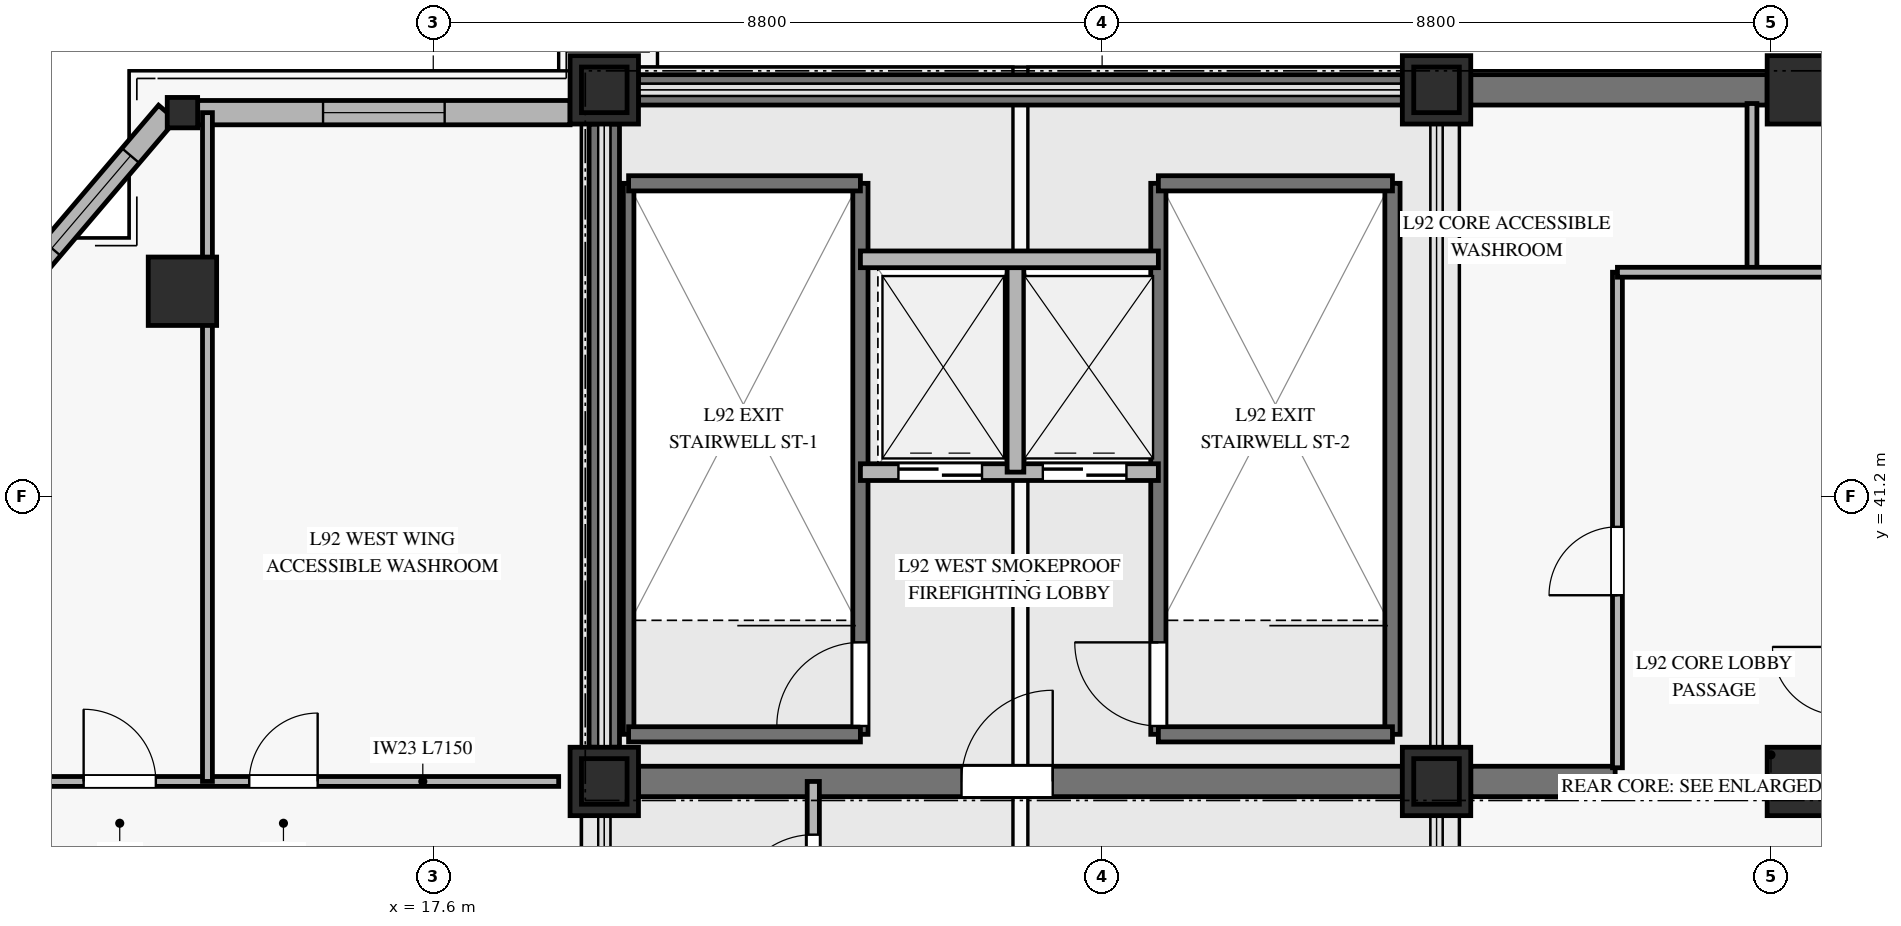
"""IFC4 building model, lengths in metres.
Left out: names, types, materials, properties, quantities, classifications, styles, units other than length and angle.
Written with IfcOpenShell. Run it as: python <this file> out.ifc"""

import sys

from ifc_helpers import new_model, si_unit, direction, frame, frame_2d, origin, origin_2d, place, context, subcontext, project, spatial, rectangle, hollow_rectangle, extrude, source, transform, mapped, element, fill, save


model = new_model("IFC4")
c1 = context("Model", 3, precision=1e-05, world=origin(), true_north=direction((0.0, 1.0)))
c2 = subcontext(c1, "Body", "Model", "MODEL_VIEW")
j1 = project(units=[si_unit("LENGTHUNIT", "METRE"), si_unit("PLANEANGLEUNIT", "RADIAN")], contexts=[c1])
p1 = place(None, origin())
s1 = spatial("IfcSite", under=j1, at=p1, CompositionType="ELEMENT")
p2 = place(p1, origin())
s2 = spatial("IfcBuilding", under=s1, at=p2, CompositionType="ELEMENT")
p3 = place(p2, frame((0.0, 0.0, 352.7)))
s3 = spatial("IfcBuildingStorey", under=s2, at=p3, CompositionType="ELEMENT", Elevation=352.7)
m1 = source(origin(), c2, "Body", "SweptSolid", [
    extrude(rectangle(XDim=0.9, YDim=0.9, at=origin_2d()), origin(), (0.0, 0.0, 1.0), 6.16),
])
for number, where, z_axis, x_axis in (
    (1, (19.85, 37.45, 0.0), (0.0, 0.0, 1.0), (1.0, 0.0, 0.0)),
    (2, (19.85, 46.55, 0.0), (0.0, 0.0, 1.0), (1.0, 0.0, 0.0)),
    (3, (30.8, 37.45, 0.0), (0.0, 0.0, 1.0), (1.0, 0.0, 0.0)),
    (4, (30.8, 46.55, 0.0), (0.0, 0.0, 1.0), (1.0, 0.0, 0.0)),
    (5, (35.6, 37.45, 0.0), (0.0, 0.0, 1.0), (1.0, 0.0, 0.0)),
    (6, (35.6, 46.55, 0.0), (0.0, 0.0, 1.0), (1.0, 0.0, 0.0)),
):
    element("IfcColumn", number, at=place(p3, frame(where, z_axis=z_axis, x_axis=x_axis)), inside=s3, PredefinedType="PILASTER", context=c2, shape_type="MappedRepresentation", body=[
        mapped(m1, transform((0.0, 0.0, 0.0), x_axis=(1.0, 0.0, 0.0), y_axis=(0.0, 1.0, 0.0), z_axis=(0.0, 0.0, 1.0), scale=1.0)),
    ])
p4 = place(p3, frame((20.3, 46.55, 0.0), z_axis=(0.0, 0.0, 1.0), x_axis=(1.0, 0.0, 0.0)))
e7 = element("IfcWall", 7, at=p4, inside=s3, PredefinedType="SHEAR", context=c2, shape_type="SweptSolid", body=[
    extrude(rectangle(XDim=10.05, YDim=0.4, at=frame_2d((5.025, 0.0))), origin(), (0.0, 0.0, 1.0), 6.16),
])
p5 = place(p3, frame((31.25, 46.55, 0.0), z_axis=(0.0, 0.0, 1.0), x_axis=(1.0, 0.0, 0.0)))
e8 = element("IfcWall", 8, at=p5, inside=s3, PredefinedType="SHEAR", context=c2, shape_type="SweptSolid", body=[
    extrude(rectangle(XDim=3.9, YDim=0.4, at=frame_2d((1.95, 0.0))), origin(), (0.0, 0.0, 1.0), 6.16),
])
p6 = place(p3, frame((20.3, 37.45, 0.0), z_axis=(0.0, 0.0, 1.0), x_axis=(1.0, 0.0, 0.0)))
e9 = element("IfcWall", 9, at=p6, inside=s3, PredefinedType="SHEAR", context=c2, shape_type="SweptSolid", body=[
    extrude(rectangle(XDim=10.05, YDim=0.4, at=frame_2d((5.025, 0.0))), origin(), (0.0, 0.0, 1.0), 6.16),
])
p7 = place(p6, frame((4.25, 0.0, 0.0)))
e10 = element("IfcOpeningElement", 10, at=p7, cuts=e9, PredefinedType="OPENING", context=c2, shape_type="SweptSolid", body=[
    extrude(rectangle(XDim=1.2, YDim=2.15, at=frame_2d((0.6, 1.075))), frame((0.0, 0.21, 0.0), z_axis=(0.0, -1.0, 0.0), x_axis=(1.0, 0.0, 0.0)), (0.0, 0.0, 1.0), 0.42),
])
p8 = place(p3, frame((31.25, 37.45, 0.0), z_axis=(0.0, 0.0, 1.0), x_axis=(1.0, 0.0, 0.0)))
e11 = element("IfcWall", 11, at=p8, inside=s3, PredefinedType="SHEAR", context=c2, shape_type="SweptSolid", body=[
    extrude(rectangle(XDim=1.9, YDim=0.4, at=frame_2d((0.95, 0.0))), origin(), (0.0, 0.0, 1.0), 6.16),
])
p9 = place(p3, frame((19.85, 37.9, 0.0), z_axis=(0.0, 0.0, 1.0), x_axis=(0.0, 1.0, 0.0)))
e12 = element("IfcWall", 12, at=p9, inside=s3, PredefinedType="SHEAR", context=c2, shape_type="SweptSolid", body=[
    extrude(rectangle(XDim=8.2, YDim=0.4, at=frame_2d((4.1, 0.0))), origin(), (0.0, 0.0, 1.0), 6.16),
])
m2 = source(origin(), c2, "Body", "SweptSolid", [
    extrude(hollow_rectangle(XDim=0.9, YDim=0.9, WallThickness=0.04, at=origin_2d()), origin(), (0.0, 0.0, 1.0), 6.16),
])
p10 = place(p3, frame((14.3, 43.9, 0.0), z_axis=(0.0, 0.0, 1.0), x_axis=(1.0, 0.0, 0.0)))
e13 = element("IfcColumn", 13, at=p10, inside=s3, PredefinedType="COLUMN", context=c2, shape_type="MappedRepresentation", body=[
    mapped(m2, transform((0.0, 0.0, 0.0), x_axis=(1.0, 0.0, 0.0), y_axis=(0.0, 1.0, 0.0), z_axis=(0.0, 0.0, 1.0), scale=1.0)),
])
m3 = source(origin(), c2, "Body", "SweptSolid", [
    extrude(hollow_rectangle(XDim=0.4, YDim=0.4, WallThickness=0.02, at=origin_2d()), origin(), (0.0, 0.0, 1.0), 6.16),
])
p11 = place(p3, frame((14.3, 46.25, 0.0), z_axis=(0.0, 0.0, 1.0), x_axis=(1.0, 0.0, 0.0)))
e14 = element("IfcColumn", 14, at=p11, inside=s3, PredefinedType="COLUMN", context=c2, shape_type="MappedRepresentation", body=[
    mapped(m3, transform((0.0, 0.0, 0.0), x_axis=(1.0, 0.0, 0.0), y_axis=(0.0, 1.0, 0.0), z_axis=(0.0, 0.0, 1.0), scale=1.0)),
])
m4 = source(origin(), c2, "Body", "SweptSolid", [
    extrude(hollow_rectangle(XDim=0.6, YDim=0.6, WallThickness=0.028, at=origin_2d()), origin(), (0.0, 0.0, 1.0), 21.147),
])
for number, where, z_axis, x_axis in (
    (15, (30.8, 37.45, 6.4), (0.0, 0.0, 1.0), (1.0, 0.0, 0.0)),
    (16, (30.8, 46.55, 6.4), (0.0, 0.0, 1.0), (1.0, 0.0, 0.0)),
    (17, (19.85, 46.55, 6.4), (0.0, 0.0, 1.0), (1.0, 0.0, 0.0)),
    (18, (19.85, 37.45, 6.4), (0.0, 0.0, 1.0), (1.0, 0.0, 0.0)),
):
    element("IfcColumn", number, at=place(p3, frame(where, z_axis=z_axis, x_axis=x_axis)), inside=s3, PredefinedType="COLUMN", context=c2, shape_type="MappedRepresentation", body=[
        mapped(m4, transform((0.0, 0.0, 0.0), x_axis=(1.0, 0.0, 0.0), y_axis=(0.0, 1.0, 0.0), z_axis=(0.0, 0.0, 1.0), scale=1.0)),
    ])
p12 = place(p3, frame((14.5, 46.25, 0.0), z_axis=(0.0, 0.0, 1.0), x_axis=(1.0, 0.0, 0.0)))
e19 = element("IfcWall", 19, at=p12, inside=s3, PredefinedType="SOLIDWALL", context=c2, shape_type="SweptSolid", body=[
    extrude(rectangle(XDim=4.9, YDim=0.32, at=frame_2d((2.45, 0.0))), origin(), (0.0, 0.0, 1.0), 5.79),
])
p13 = place(p12, frame((1.65, 0.0, 0.45)))
e20 = element("IfcOpeningElement", 20, at=p13, cuts=e19, PredefinedType="OPENING", context=c2, shape_type="SweptSolid", body=[
    extrude(rectangle(XDim=1.6, YDim=2.0, at=frame_2d((0.8, 1.0))), frame((0.0, 0.17, 0.0), z_axis=(0.0, -1.0, 0.0), x_axis=(1.0, 0.0, 0.0)), (0.0, 0.0, 1.0), 0.34),
])
p14 = place(p3, frame((14.1, 46.25, 0.0), z_axis=(0.0, 0.0, 1.0), x_axis=(-0.648103010114, -0.761552682538, 0.0)))
e21 = element("IfcWall", 21, at=p14, inside=s3, PredefinedType="SOLIDWALL", context=c2, shape_type="SweptSolid", body=[
    extrude(rectangle(XDim=3.086, YDim=0.3, at=frame_2d((1.543, 0.0))), origin(), (0.0, 0.0, 1.0), 5.79),
])
p15 = place(p14, frame((0.743, 0.0, 0.45)))
e22 = element("IfcOpeningElement", 22, at=p15, cuts=e21, PredefinedType="OPENING", context=c2, shape_type="SweptSolid", body=[
    extrude(rectangle(XDim=1.6, YDim=2.0, at=frame_2d((0.8, 1.0))), frame((0.0, 0.16, 0.0), z_axis=(0.0, -1.0, 0.0), x_axis=(1.0, 0.0, 0.0)), (0.0, 0.0, 1.0), 0.32),
])
p16 = place(p3, frame((20.17, 38.07, 0.0), z_axis=(0.0, 0.0, 1.0), x_axis=(0.0, 1.0, 0.0)))
e23 = element("IfcWall", 23, at=p16, inside=s3, PredefinedType="SOLIDWALL", context=c2, shape_type="SweptSolid", body=[
    extrude(rectangle(XDim=7.25, YDim=0.14, at=frame_2d((3.625, 0.0))), origin(), (0.0, 0.0, 1.0), 6.4),
])
p17 = place(p3, frame((23.22, 38.07, 0.0), z_axis=(0.0, 0.0, 1.0), x_axis=(0.0, 1.0, 0.0)))
e24 = element("IfcWall", 24, at=p17, inside=s3, PredefinedType="SOLIDWALL", context=c2, shape_type="SweptSolid", body=[
    extrude(rectangle(XDim=7.25, YDim=0.2, at=frame_2d((3.625, 0.0))), origin(), (0.0, 0.0, 1.0), 6.4),
])
p18 = place(p17, frame((0.11, 0.0, 0.0)))
e25 = element("IfcOpeningElement", 25, at=p18, cuts=e24, PredefinedType="OPENING", context=c2, shape_type="SweptSolid", body=[
    extrude(rectangle(XDim=1.1, YDim=2.15, at=frame_2d((0.55, 1.075))), frame((0.0, 0.11, 0.0), z_axis=(0.0, -1.0, 0.0), x_axis=(1.0, 0.0, 0.0)), (0.0, 0.0, 1.0), 0.22),
])
for number, where, z_axis, x_axis in (
    (26, (20.17, 45.32, 0.0), (0.0, 0.0, 1.0), (1.0, 0.0, 0.0)),
    (27, (20.17, 38.07, 0.0), (0.0, 0.0, 1.0), (1.0, 0.0, 0.0)),
):
    element("IfcWall", number, at=place(p3, frame(where, z_axis=z_axis, x_axis=x_axis)), inside=s3, PredefinedType="SOLIDWALL", context=c2, shape_type="SweptSolid", body=[
        extrude(rectangle(XDim=3.05, YDim=0.2, at=frame_2d((1.525, 0.0))), origin(), (0.0, 0.0, 1.0), 6.4),
    ])
p19 = place(p3, frame((27.14, 38.07, 0.0), z_axis=(0.0, 0.0, 1.0), x_axis=(0.0, 1.0, 0.0)))
e28 = element("IfcWall", 28, at=p19, inside=s3, PredefinedType="SOLIDWALL", context=c2, shape_type="SweptSolid", body=[
    extrude(rectangle(XDim=7.25, YDim=0.2, at=frame_2d((3.625, 0.0))), origin(), (0.0, 0.0, 1.0), 6.4),
])
p20 = place(p19, frame((0.11, 0.0, 0.0)))
e29 = element("IfcOpeningElement", 29, at=p20, cuts=e28, PredefinedType="OPENING", context=c2, shape_type="SweptSolid", body=[
    extrude(rectangle(XDim=1.1, YDim=2.15, at=frame_2d((0.55, 1.075))), frame((0.0, 0.11, 0.0), z_axis=(0.0, -1.0, 0.0), x_axis=(1.0, 0.0, 0.0)), (0.0, 0.0, 1.0), 0.22),
])
p21 = place(p3, frame((30.22, 38.07, 0.0), z_axis=(0.0, 0.0, 1.0), x_axis=(0.0, 1.0, 0.0)))
e30 = element("IfcWall", 30, at=p21, inside=s3, PredefinedType="SOLIDWALL", context=c2, shape_type="SweptSolid", body=[
    extrude(rectangle(XDim=7.25, YDim=0.2, at=frame_2d((3.625, 0.0))), origin(), (0.0, 0.0, 1.0), 6.4),
])
for number, where, z_axis, x_axis in (
    (31, (27.14, 45.32, 0.0), (0.0, 0.0, 1.0), (1.0, 0.0, 0.0)),
    (32, (27.14, 38.07, 0.0), (0.0, 0.0, 1.0), (1.0, 0.0, 0.0)),
):
    element("IfcWall", number, at=place(p3, frame(where, z_axis=z_axis, x_axis=x_axis)), inside=s3, PredefinedType="SOLIDWALL", context=c2, shape_type="SweptSolid", body=[
        extrude(rectangle(XDim=3.08, YDim=0.2, at=frame_2d((1.54, 0.0))), origin(), (0.0, 0.0, 1.0), 6.4),
    ])
p22 = place(p3, frame((23.22, 41.52, 0.0), z_axis=(0.0, 0.0, 1.0), x_axis=(1.0, 0.0, 0.0)))
e33 = element("IfcWall", 33, at=p22, inside=s3, PredefinedType="SOLIDWALL", context=c2, shape_type="SweptSolid", body=[
    extrude(rectangle(XDim=3.92, YDim=0.22, at=frame_2d((1.96, 0.0))), origin(), (0.0, 0.0, 1.0), 6.16),
])
p23 = place(p22, frame((0.5, 0.0, 0.0)))
e34 = element("IfcOpeningElement", 34, at=p23, cuts=e33, PredefinedType="OPENING", context=c2, shape_type="SweptSolid", body=[
    extrude(rectangle(XDim=1.1, YDim=2.2, at=frame_2d((0.55, 1.1))), frame((0.0, 0.12, 0.0), z_axis=(0.0, -1.0, 0.0), x_axis=(1.0, 0.0, 0.0)), (0.0, 0.0, 1.0), 0.24),
])
p24 = place(p22, frame((2.4, 0.0, 0.0)))
e35 = element("IfcOpeningElement", 35, at=p24, cuts=e33, PredefinedType="OPENING", context=c2, shape_type="SweptSolid", body=[
    extrude(rectangle(XDim=1.1, YDim=2.2, at=frame_2d((0.55, 1.1))), frame((0.0, 0.12, 0.0), z_axis=(0.0, -1.0, 0.0), x_axis=(1.0, 0.0, 0.0)), (0.0, 0.0, 1.0), 0.24),
])
p25 = place(p3, frame((25.26, 41.52, 0.0), z_axis=(0.0, 0.0, 1.0), x_axis=(0.0, 1.0, 0.0)))
e36 = element("IfcWall", 36, at=p25, inside=s3, PredefinedType="SOLIDWALL", context=c2, shape_type="SweptSolid", body=[
    extrude(rectangle(XDim=2.8, YDim=0.22, at=frame_2d((1.4, 0.0))), origin(), (0.0, 0.0, 1.0), 6.16),
])
p26 = place(p3, frame((23.22, 44.32, 0.0), z_axis=(0.0, 0.0, 1.0), x_axis=(1.0, 0.0, 0.0)))
e37 = element("IfcWall", 37, at=p26, inside=s3, PredefinedType="SOLIDWALL", context=c2, shape_type="SweptSolid", body=[
    extrude(rectangle(XDim=3.92, YDim=0.22, at=frame_2d((1.96, 0.0))), origin(), (0.0, 0.0, 1.0), 6.16),
])
p27 = place(p3, frame((33.18, 37.63, 0.0), z_axis=(0.0, 0.0, 1.0), x_axis=(0.0, 1.0, 0.0)))
e38 = element("IfcWall", 38, at=p27, inside=s3, PredefinedType="PARTITIONING", context=c2, shape_type="SweptSolid", body=[
    extrude(rectangle(XDim=6.52, YDim=0.13, at=frame_2d((3.26, 0.0))), origin(), (0.0, 0.0, 1.0), 5.245),
])
p28 = place(p27, frame((2.27, 0.0, 0.0)))
e39 = element("IfcOpeningElement", 39, at=p28, cuts=e38, PredefinedType="OPENING", context=c2, shape_type="SweptSolid", body=[
    extrude(rectangle(XDim=0.9, YDim=2.1, at=frame_2d((0.45, 1.05))), frame((0.0, 0.075, 0.0), z_axis=(0.0, -1.0, 0.0), x_axis=(1.0, 0.0, 0.0)), (0.0, 0.0, 1.0), 0.15),
])
p29 = place(p3, frame((34.95, 44.15, 0.0), z_axis=(0.0, 0.0, 1.0), x_axis=(0.0, 1.0, 0.0)))
e40 = element("IfcWall", 40, at=p29, inside=s3, PredefinedType="PARTITIONING", context=c2, shape_type="SweptSolid", body=[
    extrude(rectangle(XDim=2.22, YDim=0.13, at=frame_2d((1.11, 0.0))), origin(), (0.0, 0.0, 1.0), 6.16),
])
p30 = place(p3, frame((33.18, 44.15, 0.0), z_axis=(0.0, 0.0, 1.0), x_axis=(1.0, 0.0, 0.0)))
e41 = element("IfcWall", 41, at=p30, inside=s3, PredefinedType="PARTITIONING", context=c2, shape_type="SweptSolid", body=[
    extrude(rectangle(XDim=2.94, YDim=0.13, at=frame_2d((1.47, 0.0))), origin(), (0.0, 0.0, 1.0), 5.445),
])
p31 = place(p3, frame((22.6, 23.5, 0.0), z_axis=(0.0, 0.0, 1.0), x_axis=(0.0, 1.0, 0.0)))
e42 = element("IfcWall", 42, at=p31, inside=s3, PredefinedType="PARTITIONING", context=c2, shape_type="SweptSolid", body=[
    extrude(rectangle(XDim=13.95, YDim=0.16, at=frame_2d((6.975, 0.0))), origin(), (0.0, 0.0, 1.0), 5.745),
])
p32 = place(p31, frame((12.2, 0.0, 0.0)))
e43 = element("IfcOpeningElement", 43, at=p32, cuts=e42, PredefinedType="OPENING", context=c2, shape_type="SweptSolid", body=[
    extrude(rectangle(XDim=1.05, YDim=2.15, at=frame_2d((0.525, 1.075))), frame((0.0, 0.09, 0.0), z_axis=(0.0, -1.0, 0.0), x_axis=(1.0, 0.0, 0.0)), (0.0, 0.0, 1.0), 0.18),
])
p33 = place(p3, frame((12.1, 37.45, 0.0), z_axis=(0.0, 0.0, 1.0), x_axis=(1.0, 0.0, 0.0)))
e44 = element("IfcWall", 44, at=p33, inside=s3, PredefinedType="PARTITIONING", context=c2, shape_type="SweptSolid", body=[
    extrude(rectangle(XDim=7.15, YDim=0.13, at=frame_2d((3.575, 0.0))), origin(), (0.0, 0.0, 1.0), 5.795),
])
p34 = place(p33, frame((0.9, 0.0, 0.0)))
e45 = element("IfcOpeningElement", 45, at=p34, cuts=e44, PredefinedType="OPENING", context=c2, shape_type="SweptSolid", body=[
    extrude(rectangle(XDim=0.95, YDim=2.1, at=frame_2d((0.475, 1.05))), frame((0.0, 0.075, 0.0), z_axis=(0.0, -1.0, 0.0), x_axis=(1.0, 0.0, 0.0)), (0.0, 0.0, 1.0), 0.15),
])
p35 = place(p33, frame((3.079, 0.0, 0.0)))
e46 = element("IfcOpeningElement", 46, at=p35, cuts=e44, PredefinedType="OPENING", context=c2, shape_type="SweptSolid", body=[
    extrude(rectangle(XDim=0.9, YDim=2.1, at=frame_2d((0.45, 1.05))), frame((0.0, 0.075, 0.0), z_axis=(0.0, -1.0, 0.0), x_axis=(1.0, 0.0, 0.0)), (0.0, 0.0, 1.0), 0.15),
])
p36 = place(p3, frame((14.629, 37.45, 0.0), z_axis=(0.0, 0.0, 1.0), x_axis=(0.0, 1.0, 0.0)))
e47 = element("IfcWall", 47, at=p36, inside=s3, PredefinedType="PARTITIONING", context=c2, shape_type="SweptSolid", body=[
    extrude(rectangle(XDim=8.8, YDim=0.13, at=frame_2d((4.4, 0.0))), origin(), (0.0, 0.0, 1.0), 5.795),
])
m5 = source(origin(), c2, "Body", "SweptSolid", [
    extrude(rectangle(XDim=1.6, YDim=2.0, at=frame_2d((0.8, 1.0))), frame((0.0, 0.03, 0.0), z_axis=(0.0, -1.0, 0.0), x_axis=(1.0, 0.0, 0.0)), (0.0, 0.0, 1.0), 0.06),
])
p37 = place(p13, origin())
e48 = element("IfcWindow", 48, at=p37, inside=s3, PartitioningType="SINGLE_PANEL", PredefinedType="WINDOW", context=c2, shape_type="MappedRepresentation", body=[
    mapped(m5, transform((0.0, 0.0, 0.0), x_axis=(1.0, 0.0, 0.0), y_axis=(0.0, 1.0, 0.0), z_axis=(0.0, 0.0, 1.0), scale=1.0)),
])
fill(e20, e48)
p38 = place(p15, origin())
e49 = element("IfcWindow", 49, at=p38, inside=s3, PartitioningType="SINGLE_PANEL", PredefinedType="WINDOW", context=c2, shape_type="MappedRepresentation", body=[
    mapped(m5, transform((0.0, 0.0, 0.0), x_axis=(1.0, 0.0, 0.0), y_axis=(0.0, 1.0, 0.0), z_axis=(0.0, 0.0, 1.0), scale=1.0)),
])
fill(e22, e49)
m6 = source(origin(), c2, "Body", "SweptSolid", [
    extrude(rectangle(XDim=1.1, YDim=2.15, at=frame_2d((0.55, 1.075))), frame((0.0, 0.025, 0.0), z_axis=(0.0, -1.0, 0.0), x_axis=(1.0, 0.0, 0.0)), (0.0, 0.0, 1.0), 0.05),
])
p39 = place(p18, origin())
e50 = element("IfcDoor", 50, at=p39, inside=s3, OperationType="SINGLE_SWING_LEFT", PredefinedType="DOOR", context=c2, shape_type="MappedRepresentation", body=[
    mapped(m6, transform((0.0, 0.0, 0.0), x_axis=(1.0, 0.0, 0.0), y_axis=(0.0, 1.0, 0.0), z_axis=(0.0, 0.0, 1.0), scale=1.0)),
])
fill(e25, e50)
p40 = place(p20, origin())
e51 = element("IfcDoor", 51, at=p40, inside=s3, OperationType="SINGLE_SWING_RIGHT", PredefinedType="DOOR", context=c2, shape_type="MappedRepresentation", body=[
    mapped(m6, transform((0.0, 0.0, 0.0), x_axis=(1.0, 0.0, 0.0), y_axis=(0.0, 1.0, 0.0), z_axis=(0.0, 0.0, 1.0), scale=1.0)),
])
fill(e29, e51)
m7 = source(origin(), c2, "Body", "SweptSolid", [
    extrude(rectangle(XDim=1.1, YDim=2.2, at=frame_2d((0.55, 1.1))), frame((0.0, 0.025, 0.0), z_axis=(0.0, -1.0, 0.0), x_axis=(1.0, 0.0, 0.0)), (0.0, 0.0, 1.0), 0.05),
])
p41 = place(p23, origin())
e52 = element("IfcDoor", 52, at=p41, inside=s3, OperationType="SLIDING_TO_LEFT", PredefinedType="DOOR", context=c2, shape_type="MappedRepresentation", body=[
    mapped(m7, transform((0.0, 0.0, 0.0), x_axis=(1.0, 0.0, 0.0), y_axis=(0.0, 1.0, 0.0), z_axis=(0.0, 0.0, 1.0), scale=1.0)),
])
fill(e34, e52)
p42 = place(p24, origin())
e53 = element("IfcDoor", 53, at=p42, inside=s3, OperationType="SLIDING_TO_LEFT", PredefinedType="DOOR", context=c2, shape_type="MappedRepresentation", body=[
    mapped(m7, transform((0.0, 0.0, 0.0), x_axis=(1.0, 0.0, 0.0), y_axis=(0.0, 1.0, 0.0), z_axis=(0.0, 0.0, 1.0), scale=1.0)),
])
fill(e35, e53)
m8 = source(origin(), c2, "Body", "SweptSolid", [
    extrude(rectangle(XDim=1.2, YDim=2.15, at=frame_2d((0.6, 1.075))), frame((0.0, 0.025, 0.0), z_axis=(0.0, -1.0, 0.0), x_axis=(1.0, 0.0, 0.0)), (0.0, 0.0, 1.0), 0.05),
])
p43 = place(p7, origin())
e54 = element("IfcDoor", 54, at=p43, inside=s3, OperationType="SINGLE_SWING_RIGHT", PredefinedType="DOOR", context=c2, shape_type="MappedRepresentation", body=[
    mapped(m8, transform((0.0, 0.0, 0.0), x_axis=(1.0, 0.0, 0.0), y_axis=(0.0, 1.0, 0.0), z_axis=(0.0, 0.0, 1.0), scale=1.0)),
])
fill(e10, e54)
m9 = source(origin(), c2, "Body", "SweptSolid", [
    extrude(rectangle(XDim=0.9, YDim=2.1, at=frame_2d((0.45, 1.05))), frame((0.0, 0.025, 0.0), z_axis=(0.0, -1.0, 0.0), x_axis=(1.0, 0.0, 0.0)), (0.0, 0.0, 1.0), 0.05),
])
p44 = place(p28, origin())
e55 = element("IfcDoor", 55, at=p44, inside=s3, OperationType="SINGLE_SWING_LEFT", PredefinedType="DOOR", context=c2, shape_type="MappedRepresentation", body=[
    mapped(m9, transform((0.0, 0.0, 0.0), x_axis=(1.0, 0.0, 0.0), y_axis=(0.0, 1.0, 0.0), z_axis=(0.0, 0.0, 1.0), scale=1.0)),
])
fill(e39, e55)
m10 = source(origin(), c2, "Body", "SweptSolid", [
    extrude(rectangle(XDim=1.05, YDim=2.15, at=frame_2d((0.525, 1.075))), frame((0.0, 0.025, 0.0), z_axis=(0.0, -1.0, 0.0), x_axis=(1.0, 0.0, 0.0)), (0.0, 0.0, 1.0), 0.05),
])
p45 = place(p32, origin())
e56 = element("IfcDoor", 56, at=p45, inside=s3, OperationType="SINGLE_SWING_LEFT", PredefinedType="DOOR", context=c2, shape_type="MappedRepresentation", body=[
    mapped(m10, transform((0.0, 0.0, 0.0), x_axis=(1.0, 0.0, 0.0), y_axis=(0.0, 1.0, 0.0), z_axis=(0.0, 0.0, 1.0), scale=1.0)),
])
fill(e43, e56)
m11 = source(origin(), c2, "Body", "SweptSolid", [
    extrude(rectangle(XDim=0.95, YDim=2.1, at=frame_2d((0.475, 1.05))), frame((0.0, 0.025, 0.0), z_axis=(0.0, -1.0, 0.0), x_axis=(1.0, 0.0, 0.0)), (0.0, 0.0, 1.0), 0.05),
])
p46 = place(p34, origin())
e57 = element("IfcDoor", 57, at=p46, inside=s3, OperationType="SINGLE_SWING_LEFT", PredefinedType="DOOR", context=c2, shape_type="MappedRepresentation", body=[
    mapped(m11, transform((0.0, 0.0, 0.0), x_axis=(1.0, 0.0, 0.0), y_axis=(0.0, 1.0, 0.0), z_axis=(0.0, 0.0, 1.0), scale=1.0)),
])
fill(e45, e57)
p47 = place(p35, origin())
e58 = element("IfcDoor", 58, at=p47, inside=s3, OperationType="SINGLE_SWING_RIGHT", PredefinedType="DOOR", context=c2, shape_type="MappedRepresentation", body=[
    mapped(m9, transform((0.0, 0.0, 0.0), x_axis=(1.0, 0.0, 0.0), y_axis=(0.0, 1.0, 0.0), z_axis=(0.0, 0.0, 1.0), scale=1.0)),
])
fill(e46, e58)
save(model, sys.argv[1])
